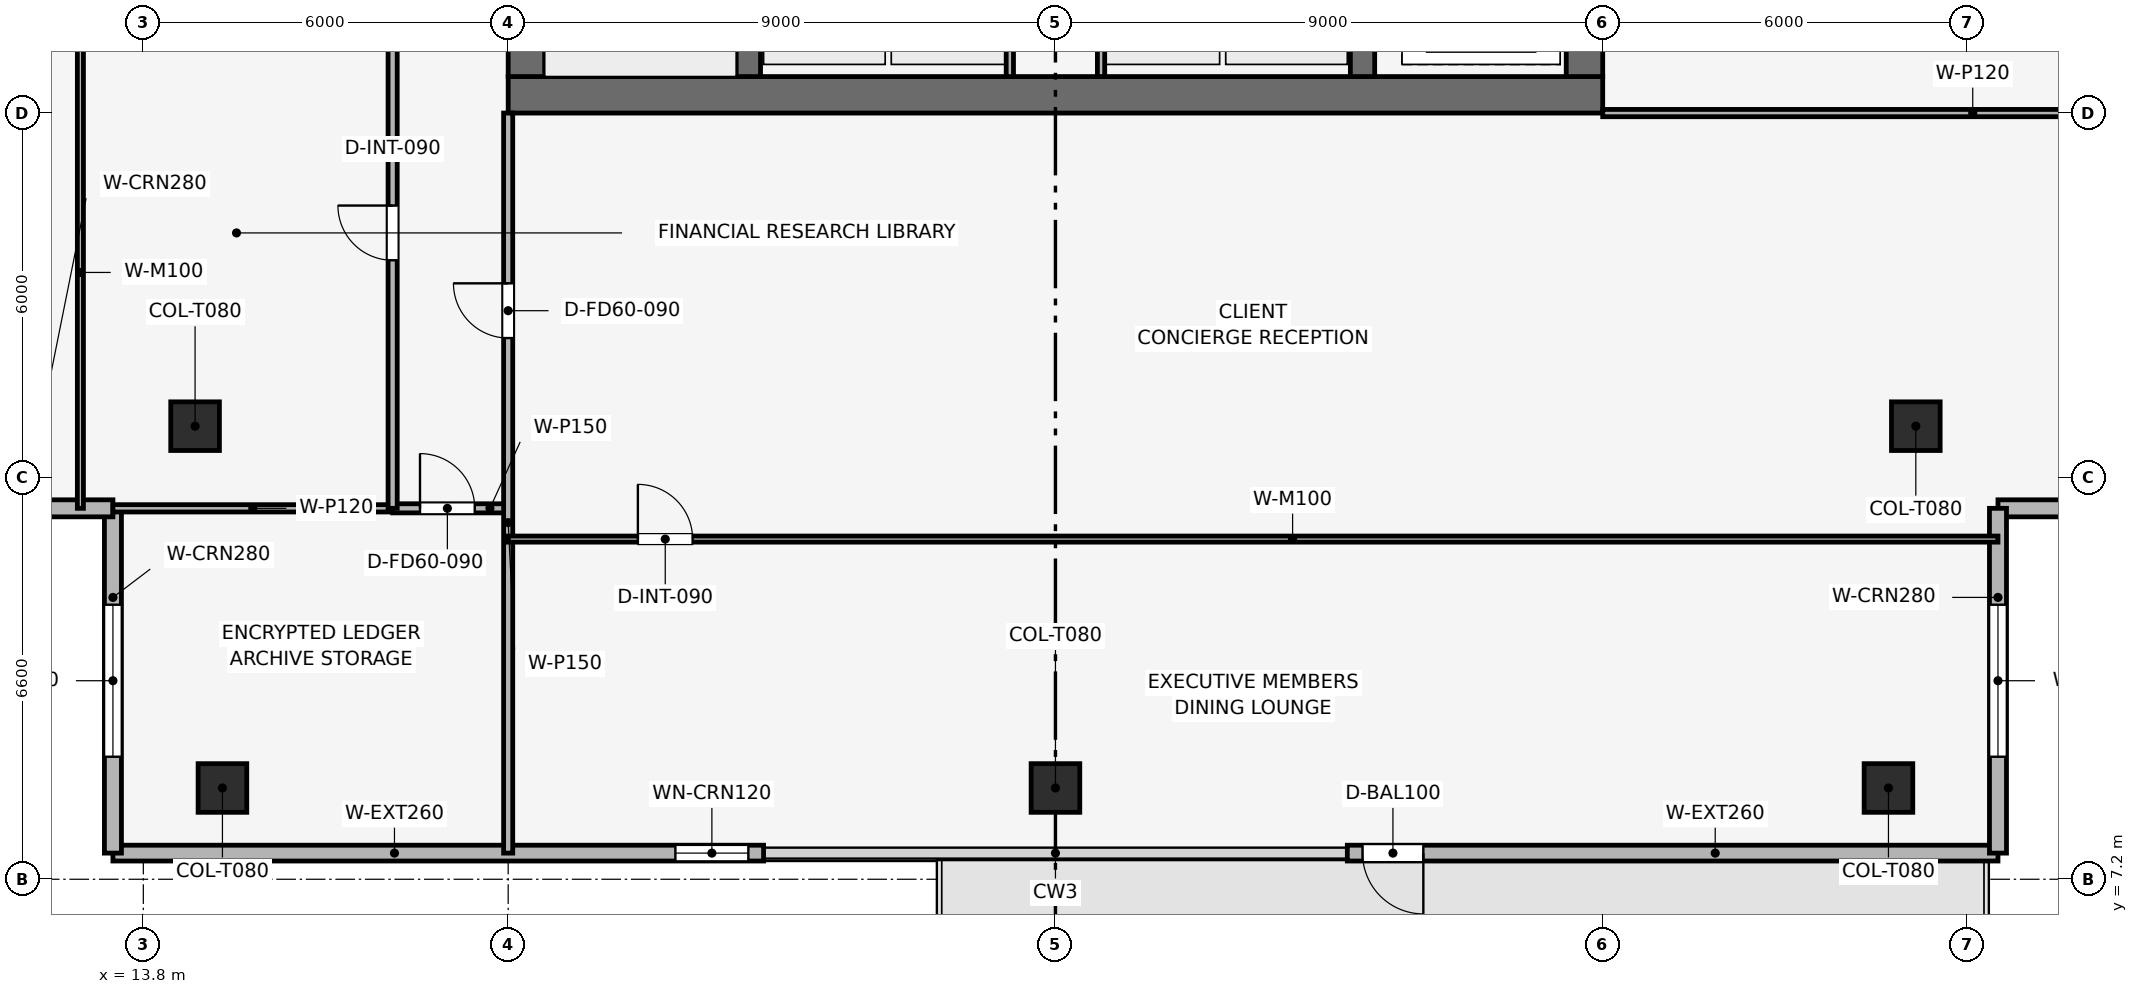
"""IFC4 building model, lengths in metres.
Left out: names, types, materials, properties, quantities, classifications, styles, units other than length and angle.
Written with IfcOpenShell. Run it as: python <this file> out.ifc"""

import sys

from ifc_helpers import new_model, si_unit, direction, frame, frame_2d, origin, origin_2d, place, context, subcontext, project, spatial, rectangle, extrude, element, fill, save


model = new_model("IFC4")
c1 = context("Model", 3, precision=1e-05, world=origin(), true_north=direction((0.0, 1.0)))
c2 = subcontext(c1, "Body", "Model", "MODEL_VIEW")
j1 = project(units=[si_unit("LENGTHUNIT", "METRE"), si_unit("PLANEANGLEUNIT", "RADIAN")], contexts=[c1])
p1 = place(None, origin())
s1 = spatial("IfcSite", under=j1, at=p1, CompositionType="ELEMENT")
p2 = place(p1, origin())
s2 = spatial("IfcBuilding", under=s1, at=p2, CompositionType="ELEMENT")
p3 = place(p2, frame((0.0, 0.0, 351.75)))
s3 = spatial("IfcBuildingStorey", under=s2, at=p3, CompositionType="ELEMENT", Elevation=351.75)
p4 = place(p3, frame((19.8, 20.1, 0.0), z_axis=(0.0, 0.0, 1.0), x_axis=(1.0, 0.0, 0.0)))
e1 = element("IfcWall", 1, at=p4, inside=s3, PredefinedType="SHEAR", context=c2, shape_type="SweptSolid", body=[
    extrude(rectangle(XDim=18.0, YDim=0.6, at=frame_2d((9.0, 0.0))), origin(), (0.0, 0.0, 1.0), 3.75),
])
p5 = place(p3, frame((20.1, 20.4, 0.0), z_axis=(0.0, 0.0, 1.0), x_axis=(0.0, 1.0, 0.0)))
e2 = element("IfcWall", 2, at=p5, inside=s3, PredefinedType="SHEAR", context=c2, shape_type="SweptSolid", body=[
    extrude(rectangle(XDim=16.8, YDim=0.6, at=frame_2d((8.4, 0.0))), origin(), (0.0, 0.0, 1.0), 3.75),
])
p6 = place(p5, frame((10.4, 0.0, 0.0)))
e3 = element("IfcOpeningElement", 3, at=p6, cuts=e2, PredefinedType="OPENING", context=c2, shape_type="SweptSolid", body=[
    extrude(rectangle(XDim=1.1, YDim=2.15, at=frame_2d((0.55, 1.075))), frame((0.0, 0.31, 0.0), z_axis=(0.0, -1.0, 0.0), x_axis=(1.0, 0.0, 0.0)), (0.0, 0.0, 1.0), 0.62),
])
p7 = place(p3, frame((37.5, 20.4, 0.0), z_axis=(0.0, 0.0, 1.0), x_axis=(0.0, 1.0, 0.0)))
e4 = element("IfcWall", 4, at=p7, inside=s3, PredefinedType="SHEAR", context=c2, shape_type="SweptSolid", body=[
    extrude(rectangle(XDim=16.8, YDim=0.6, at=frame_2d((8.4, 0.0))), origin(), (0.0, 0.0, 1.0), 3.75),
])
p8 = place(p7, frame((4.9, 0.0, 0.0)))
e5 = element("IfcOpeningElement", 5, at=p8, cuts=e4, PredefinedType="OPENING", context=c2, shape_type="SweptSolid", body=[
    extrude(rectangle(XDim=1.1, YDim=2.15, at=frame_2d((0.55, 1.075))), frame((0.0, 0.31, 0.0), z_axis=(0.0, -1.0, 0.0), x_axis=(1.0, 0.0, 0.0)), (0.0, 0.0, 1.0), 0.62),
])
for number, where, z_axis, x_axis in (
    (6, (23.75, 20.4, 0.0), (0.0, 0.0, 1.0), (0.0, 1.0, 0.0)),
    (7, (33.85, 20.4, 0.0), (0.0, 0.0, 1.0), (0.0, 1.0, 0.0)),
):
    element("IfcWall", number, at=place(p3, frame(where, z_axis=z_axis, x_axis=x_axis)), inside=s3, PredefinedType="SHEAR", context=c2, shape_type="SweptSolid", body=[
        extrude(rectangle(XDim=16.8, YDim=0.4, at=frame_2d((8.4, 0.0))), origin(), (0.0, 0.0, 1.0), 3.75),
    ])
p9 = place(p3, frame((15.101, 8.701, 0.003), z_axis=(0.178469584564, 0.229623714174, 0.956776649629), x_axis=(-0.789563193814, 0.613669261878, 0.0)))
e8 = element("IfcColumn", 8, at=p9, inside=s3, PredefinedType="COLUMN", context=c2, shape_type="SweptSolid", body=[
    extrude(rectangle(XDim=0.8, YDim=0.8, at=origin_2d()), origin(), (0.0, 0.0, 1.0), 3.642),
])
p10 = place(p3, frame((28.8, 8.701, 0.003), z_axis=(0.0, 0.233370375419, 0.97238792047), x_axis=(-1.0, 0.0, 0.0)))
e9 = element("IfcColumn", 9, at=p10, inside=s3, PredefinedType="COLUMN", context=c2, shape_type="SweptSolid", body=[
    extrude(rectangle(XDim=0.8, YDim=0.8, at=origin_2d()), origin(), (0.0, 0.0, 1.0), 3.583),
])
p11 = place(p3, frame((42.499, 8.701, 0.003), z_axis=(-0.178469584564, 0.229623714174, 0.956776649629), x_axis=(-0.789563193814, -0.613669261878, 0.0)))
e10 = element("IfcColumn", 10, at=p11, inside=s3, PredefinedType="COLUMN", context=c2, shape_type="SweptSolid", body=[
    extrude(rectangle(XDim=0.8, YDim=0.8, at=origin_2d()), origin(), (0.0, 0.0, 1.0), 3.642),
])
p12 = place(p3, frame((14.651, 14.651, 0.003), z_axis=(0.180425446151, 0.180425446151, 0.966898814128), x_axis=(-0.707106781187, 0.707106781187, 0.0)))
e11 = element("IfcColumn", 11, at=p12, inside=s3, PredefinedType="COLUMN", context=c2, shape_type="SweptSolid", body=[
    extrude(rectangle(XDim=0.8, YDim=0.8, at=origin_2d()), origin(), (0.0, 0.0, 1.0), 3.604),
])
p13 = place(p3, frame((42.949, 14.651, 0.003), z_axis=(-0.180359897824, 0.180427651354, 0.966910631798), x_axis=(-0.707239558722, -0.706973978714, 0.0)))
e12 = element("IfcColumn", 12, at=p13, inside=s3, PredefinedType="COLUMN", context=c2, shape_type="SweptSolid", body=[
    extrude(rectangle(XDim=0.8, YDim=0.8, at=origin_2d()), origin(), (0.0, 0.0, 1.0), 3.603),
])
p14 = place(p3, frame((44.3, 7.63, 0.0), z_axis=(0.0, 0.0, 1.0), x_axis=(-1.0, 0.0, 0.0)))
e13 = element("IfcWall", 13, at=p14, inside=s3, PredefinedType="SOLIDWALL", context=c2, shape_type="SweptSolid", body=[
    extrude(rectangle(XDim=10.7, YDim=0.26, at=frame_2d((5.35, 0.0))), origin(), (0.0, 0.0, 1.0), 3.49),
])
p15 = place(p14, frame((9.45, 0.0, 0.0)))
e14 = element("IfcOpeningElement", 14, at=p15, cuts=e13, PredefinedType="OPENING", context=c2, shape_type="SweptSolid", body=[
    extrude(rectangle(XDim=1.0, YDim=2.2, at=frame_2d((0.5, 1.1))), frame((0.0, 0.14, 0.0), z_axis=(0.0, -1.0, 0.0), x_axis=(1.0, 0.0, 0.0)), (0.0, 0.0, 1.0), 0.28),
])
p16 = place(p3, frame((24.0, 7.63, 0.0), z_axis=(0.0, 0.0, 1.0), x_axis=(-1.0, 0.0, 0.0)))
e15 = element("IfcWall", 15, at=p16, inside=s3, PredefinedType="SOLIDWALL", context=c2, shape_type="SweptSolid", body=[
    extrude(rectangle(XDim=10.7, YDim=0.26, at=frame_2d((5.35, 0.0))), origin(), (0.0, 0.0, 1.0), 3.49),
])
p17 = place(p16, frame((0.25, 0.0, 0.9)))
e16 = element("IfcOpeningElement", 16, at=p17, cuts=e15, PredefinedType="OPENING", context=c2, shape_type="SweptSolid", body=[
    extrude(rectangle(XDim=1.2, YDim=2.1, at=frame_2d((0.6, 1.05))), frame((0.0, 0.14, 0.0), z_axis=(0.0, -1.0, 0.0), x_axis=(1.0, 0.0, 0.0)), (0.0, 0.0, 1.0), 0.28),
])
p18 = place(p3, frame((13.3, 7.63, 0.0), z_axis=(0.0, 0.0, 1.0), x_axis=(0.0, 1.0, 0.0)))
e17 = element("IfcWall", 17, at=p18, inside=s3, PredefinedType="SOLIDWALL", context=c2, shape_type="SweptSolid", body=[
    extrude(rectangle(XDim=5.67, YDim=0.28, at=frame_2d((2.835, 0.0))), origin(), (0.0, 0.0, 1.0), 3.49),
])
p19 = place(p18, frame((1.585, 0.0, 0.9)))
e18 = element("IfcOpeningElement", 18, at=p19, cuts=e17, PredefinedType="OPENING", context=c2, shape_type="SweptSolid", body=[
    extrude(rectangle(XDim=2.5, YDim=1.9, at=frame_2d((1.25, 0.95))), frame((0.0, 0.15, 0.0), z_axis=(0.0, -1.0, 0.0), x_axis=(1.0, 0.0, 0.0)), (0.0, 0.0, 1.0), 0.3),
])
p20 = place(p3, frame((13.3, 13.3, 0.0), z_axis=(0.0, 0.0, 1.0), x_axis=(-1.0, 0.0, 0.0)))
e19 = element("IfcWall", 19, at=p20, inside=s3, PredefinedType="SOLIDWALL", context=c2, shape_type="SweptSolid", body=[
    extrude(rectangle(XDim=5.67, YDim=0.28, at=frame_2d((2.835, 0.0))), origin(), (0.0, 0.0, 1.0), 3.49),
])
p21 = place(p20, frame((1.585, 0.0, 0.9)))
e20 = element("IfcOpeningElement", 20, at=p21, cuts=e19, PredefinedType="OPENING", context=c2, shape_type="SweptSolid", body=[
    extrude(rectangle(XDim=2.5, YDim=1.9, at=frame_2d((1.25, 0.95))), frame((0.0, 0.15, 0.0), z_axis=(0.0, -1.0, 0.0), x_axis=(1.0, 0.0, 0.0)), (0.0, 0.0, 1.0), 0.3),
])
p22 = place(p3, frame((49.97, 13.3, 0.0), z_axis=(0.0, 0.0, 1.0), x_axis=(-1.0, 0.0, 0.0)))
e21 = element("IfcWall", 21, at=p22, inside=s3, PredefinedType="SOLIDWALL", context=c2, shape_type="SweptSolid", body=[
    extrude(rectangle(XDim=5.67, YDim=0.28, at=frame_2d((2.835, 0.0))), origin(), (0.0, 0.0, 1.0), 3.49),
])
p23 = place(p22, frame((1.585, 0.0, 0.9)))
e22 = element("IfcOpeningElement", 22, at=p23, cuts=e21, PredefinedType="OPENING", context=c2, shape_type="SweptSolid", body=[
    extrude(rectangle(XDim=2.5, YDim=1.9, at=frame_2d((1.25, 0.95))), frame((0.0, 0.15, 0.0), z_axis=(0.0, -1.0, 0.0), x_axis=(1.0, 0.0, 0.0)), (0.0, 0.0, 1.0), 0.3),
])
p24 = place(p3, frame((44.3, 13.3, 0.0), z_axis=(0.0, 0.0, 1.0), x_axis=(0.0, -1.0, 0.0)))
e23 = element("IfcWall", 23, at=p24, inside=s3, PredefinedType="SOLIDWALL", context=c2, shape_type="SweptSolid", body=[
    extrude(rectangle(XDim=5.67, YDim=0.28, at=frame_2d((2.835, 0.0))), origin(), (0.0, 0.0, 1.0), 3.49),
])
p25 = place(p24, frame((1.585, 0.0, 0.9)))
e24 = element("IfcOpeningElement", 24, at=p25, cuts=e23, PredefinedType="OPENING", context=c2, shape_type="SweptSolid", body=[
    extrude(rectangle(XDim=2.5, YDim=1.9, at=frame_2d((1.25, 0.95))), frame((0.0, 0.15, 0.0), z_axis=(0.0, -1.0, 0.0), x_axis=(1.0, 0.0, 0.0)), (0.0, 0.0, 1.0), 0.3),
])
for number, where, z_axis, x_axis in (
    (25, (28.05, 20.4, 0.0), (0.0, 0.0, 1.0), (0.0, 1.0, 0.0)),
    (26, (29.55, 20.4, 0.0), (0.0, 0.0, 1.0), (0.0, 1.0, 0.0)),
):
    element("IfcWall", number, at=place(p3, frame(where, z_axis=z_axis, x_axis=x_axis)), inside=s3, PredefinedType="PARTITIONING", context=c2, shape_type="SweptSolid", body=[
        extrude(rectangle(XDim=8.15, YDim=0.12, at=frame_2d((4.075, 0.0))), origin(), (0.0, 0.0, 1.0), 3.49),
    ])
p26 = place(p3, frame((12.765, 13.3, 0.0), z_axis=(0.0, 0.0, 1.0), x_axis=(0.0, 1.0, 0.0)))
e27 = element("IfcWall", 27, at=p26, inside=s3, PredefinedType="MOVABLE", context=c2, shape_type="SweptSolid", body=[
    extrude(rectangle(XDim=9.058, YDim=0.1, at=frame_2d((4.529, 0.0))), origin(), (0.0, 0.0, 1.0), 3.075),
])
p27 = place(p26, frame((7.958, 0.0, 0.0)))
e28 = element("IfcOpeningElement", 28, at=p27, cuts=e27, PredefinedType="OPENING", context=c2, shape_type="SweptSolid", body=[
    extrude(rectangle(XDim=0.9, YDim=2.1, at=frame_2d((0.45, 1.05))), frame((0.0, 0.06, 0.0), z_axis=(0.0, -1.0, 0.0), x_axis=(1.0, 0.0, 0.0)), (0.0, 0.0, 1.0), 0.12),
])
p28 = place(p3, frame((13.3, 13.3, 0.0), z_axis=(0.0, 0.0, 1.0), x_axis=(1.0, 0.0, 0.0)))
e29 = element("IfcWall", 29, at=p28, inside=s3, PredefinedType="PARTITIONING", context=c2, shape_type="SweptSolid", body=[
    extrude(rectangle(XDim=4.6, YDim=0.12, at=frame_2d((2.3, 0.0))), origin(), (0.0, 0.0, 1.0), 3.175),
])
p29 = place(p3, frame((17.9, 13.3, 0.0), z_axis=(0.0, 0.0, 1.0), x_axis=(1.0, 0.0, 0.0)))
e30 = element("IfcWall", 30, at=p29, inside=s3, PredefinedType="PARTITIONING", context=c2, shape_type="SweptSolid", body=[
    extrude(rectangle(XDim=1.9, YDim=0.15, at=frame_2d((0.95, 0.0))), origin(), (0.0, 0.0, 1.0), 3.49),
])
p30 = place(p29, frame((0.45, 0.0, 0.0)))
e31 = element("IfcOpeningElement", 31, at=p30, cuts=e30, PredefinedType="OPENING", context=c2, shape_type="SweptSolid", body=[
    extrude(rectangle(XDim=0.9, YDim=2.1, at=frame_2d((0.45, 1.05))), frame((0.0, 0.085, 0.0), z_axis=(0.0, -1.0, 0.0), x_axis=(1.0, 0.0, 0.0)), (0.0, 0.0, 1.0), 0.17),
])
p31 = place(p3, frame((19.8, 7.63, 0.0), z_axis=(0.0, 0.0, 1.0), x_axis=(0.0, 1.0, 0.0)))
e32 = element("IfcWall", 32, at=p31, inside=s3, PredefinedType="PARTITIONING", context=c2, shape_type="SweptSolid", body=[
    extrude(rectangle(XDim=12.17, YDim=0.15, at=frame_2d((6.085, 0.0))), origin(), (0.0, 0.0, 1.0), 3.075),
])
p32 = place(p31, frame((8.47, 0.0, 0.0)))
e33 = element("IfcOpeningElement", 33, at=p32, cuts=e32, PredefinedType="OPENING", context=c2, shape_type="SweptSolid", body=[
    extrude(rectangle(XDim=0.9, YDim=2.1, at=frame_2d((0.45, 1.05))), frame((0.0, 0.085, 0.0), z_axis=(0.0, -1.0, 0.0), x_axis=(1.0, 0.0, 0.0)), (0.0, 0.0, 1.0), 0.17),
])
p33 = place(p3, frame((19.8, 12.794, 0.0), z_axis=(0.0, 0.0, 1.0), x_axis=(1.0, 0.0, 0.0)))
e34 = element("IfcWall", 34, at=p33, inside=s3, PredefinedType="MOVABLE", context=c2, shape_type="SweptSolid", body=[
    extrude(rectangle(XDim=24.5, YDim=0.1, at=frame_2d((12.25, 0.0))), origin(), (0.0, 0.0, 1.0), 3.075),
])
p34 = place(p33, frame((2.133, 0.0, 0.0)))
e35 = element("IfcOpeningElement", 35, at=p34, cuts=e34, PredefinedType="OPENING", context=c2, shape_type="SweptSolid", body=[
    extrude(rectangle(XDim=0.9, YDim=2.1, at=frame_2d((0.45, 1.05))), frame((0.0, 0.06, 0.0), z_axis=(0.0, -1.0, 0.0), x_axis=(1.0, 0.0, 0.0)), (0.0, 0.0, 1.0), 0.12),
])
p35 = place(p3, frame((37.8, 19.8, 0.0), z_axis=(0.0, 0.0, 1.0), x_axis=(1.0, 0.0, 0.0)))
e36 = element("IfcWall", 36, at=p35, inside=s3, PredefinedType="PARTITIONING", context=c2, shape_type="SweptSolid", body=[
    extrude(rectangle(XDim=12.17, YDim=0.12, at=frame_2d((6.085, 0.0))), origin(), (0.0, 0.0, 1.0), 3.075),
])
p36 = place(p3, frame((17.9, 13.3, 0.0), z_axis=(0.0, 0.0, 1.0), x_axis=(0.0, 1.0, 0.0)))
e37 = element("IfcWall", 37, at=p36, inside=s3, PredefinedType="PARTITIONING", context=c2, shape_type="SweptSolid", body=[
    extrude(rectangle(XDim=26.4, YDim=0.15, at=frame_2d((13.2, 0.0))), origin(), (0.0, 0.0, 1.0), 3.075),
])
p37 = place(p36, frame((4.079, 0.0, 0.0)))
e38 = element("IfcOpeningElement", 38, at=p37, cuts=e37, PredefinedType="OPENING", context=c2, shape_type="SweptSolid", body=[
    extrude(rectangle(XDim=0.9, YDim=2.1, at=frame_2d((0.45, 1.05))), frame((0.0, 0.085, 0.0), z_axis=(0.0, -1.0, 0.0), x_axis=(1.0, 0.0, 0.0)), (0.0, 0.0, 1.0), 0.17),
])
p38 = place(p36, frame((17.279, 0.0, 0.0)))
e39 = element("IfcOpeningElement", 39, at=p38, cuts=e37, PredefinedType="OPENING", context=c2, shape_type="SweptSolid", body=[
    extrude(rectangle(XDim=0.9, YDim=2.1, at=frame_2d((0.45, 1.05))), frame((0.0, 0.085, 0.0), z_axis=(0.0, -1.0, 0.0), x_axis=(1.0, 0.0, 0.0)), (0.0, 0.0, 1.0), 0.17),
])
p39 = place(p15, origin())
e40 = element("IfcDoor", 40, at=p39, inside=s3, OperationType="SINGLE_SWING_LEFT", PredefinedType="DOOR", context=c2, shape_type="SweptSolid", body=[
    extrude(rectangle(XDim=1.0, YDim=2.2, at=frame_2d((0.5, 1.1))), frame((0.0, 0.025, 0.0), z_axis=(0.0, -1.0, 0.0), x_axis=(1.0, 0.0, 0.0)), (0.0, 0.0, 1.0), 0.05),
])
fill(e14, e40)
p40 = place(p17, origin())
e41 = element("IfcWindow", 41, at=p40, inside=s3, PartitioningType="SINGLE_PANEL", PredefinedType="WINDOW", context=c2, shape_type="SweptSolid", body=[
    extrude(rectangle(XDim=1.2, YDim=2.1, at=frame_2d((0.6, 1.05))), frame((0.0, 0.03, 0.0), z_axis=(0.0, -1.0, 0.0), x_axis=(1.0, 0.0, 0.0)), (0.0, 0.0, 1.0), 0.06),
])
fill(e16, e41)
p41 = place(p19, origin())
e42 = element("IfcWindow", 42, at=p41, inside=s3, PartitioningType="SINGLE_PANEL", PredefinedType="WINDOW", context=c2, shape_type="SweptSolid", body=[
    extrude(rectangle(XDim=2.5, YDim=1.9, at=frame_2d((1.25, 0.95))), frame((0.0, 0.03, 0.0), z_axis=(0.0, -1.0, 0.0), x_axis=(1.0, 0.0, 0.0)), (0.0, 0.0, 1.0), 0.06),
])
fill(e18, e42)
p42 = place(p25, origin())
e43 = element("IfcWindow", 43, at=p42, inside=s3, PartitioningType="SINGLE_PANEL", PredefinedType="WINDOW", context=c2, shape_type="SweptSolid", body=[
    extrude(rectangle(XDim=2.5, YDim=1.9, at=frame_2d((1.25, 0.95))), frame((0.0, 0.03, 0.0), z_axis=(0.0, -1.0, 0.0), x_axis=(1.0, 0.0, 0.0)), (0.0, 0.0, 1.0), 0.06),
])
fill(e24, e43)
p43 = place(p30, origin())
e44 = element("IfcDoor", 44, at=p43, inside=s3, OperationType="SINGLE_SWING_LEFT", PredefinedType="DOOR", context=c2, shape_type="SweptSolid", body=[
    extrude(rectangle(XDim=0.9, YDim=2.1, at=frame_2d((0.45, 1.05))), frame((0.0, 0.025, 0.0), z_axis=(0.0, -1.0, 0.0), x_axis=(1.0, 0.0, 0.0)), (0.0, 0.0, 1.0), 0.05),
])
fill(e31, e44)
p44 = place(p32, origin())
e45 = element("IfcDoor", 45, at=p44, inside=s3, OperationType="SINGLE_SWING_RIGHT", PredefinedType="DOOR", context=c2, shape_type="SweptSolid", body=[
    extrude(rectangle(XDim=0.9, YDim=2.1, at=frame_2d((0.45, 1.05))), frame((0.0, 0.025, 0.0), z_axis=(0.0, -1.0, 0.0), x_axis=(1.0, 0.0, 0.0)), (0.0, 0.0, 1.0), 0.05),
])
fill(e33, e45)
p45 = place(p34, origin())
e46 = element("IfcDoor", 46, at=p45, inside=s3, OperationType="SINGLE_SWING_LEFT", PredefinedType="DOOR", context=c2, shape_type="SweptSolid", body=[
    extrude(rectangle(XDim=0.9, YDim=2.1, at=frame_2d((0.45, 1.05))), frame((0.0, 0.025, 0.0), z_axis=(0.0, -1.0, 0.0), x_axis=(1.0, 0.0, 0.0)), (0.0, 0.0, 1.0), 0.05),
])
fill(e35, e46)
p46 = place(p37, origin())
e47 = element("IfcDoor", 47, at=p46, inside=s3, OperationType="SINGLE_SWING_RIGHT", PredefinedType="DOOR", context=c2, shape_type="SweptSolid", body=[
    extrude(rectangle(XDim=0.9, YDim=2.1, at=frame_2d((0.45, 1.05))), frame((0.0, 0.025, 0.0), z_axis=(0.0, -1.0, 0.0), x_axis=(1.0, 0.0, 0.0)), (0.0, 0.0, 1.0), 0.05),
])
fill(e38, e47)
save(model, sys.argv[1])
